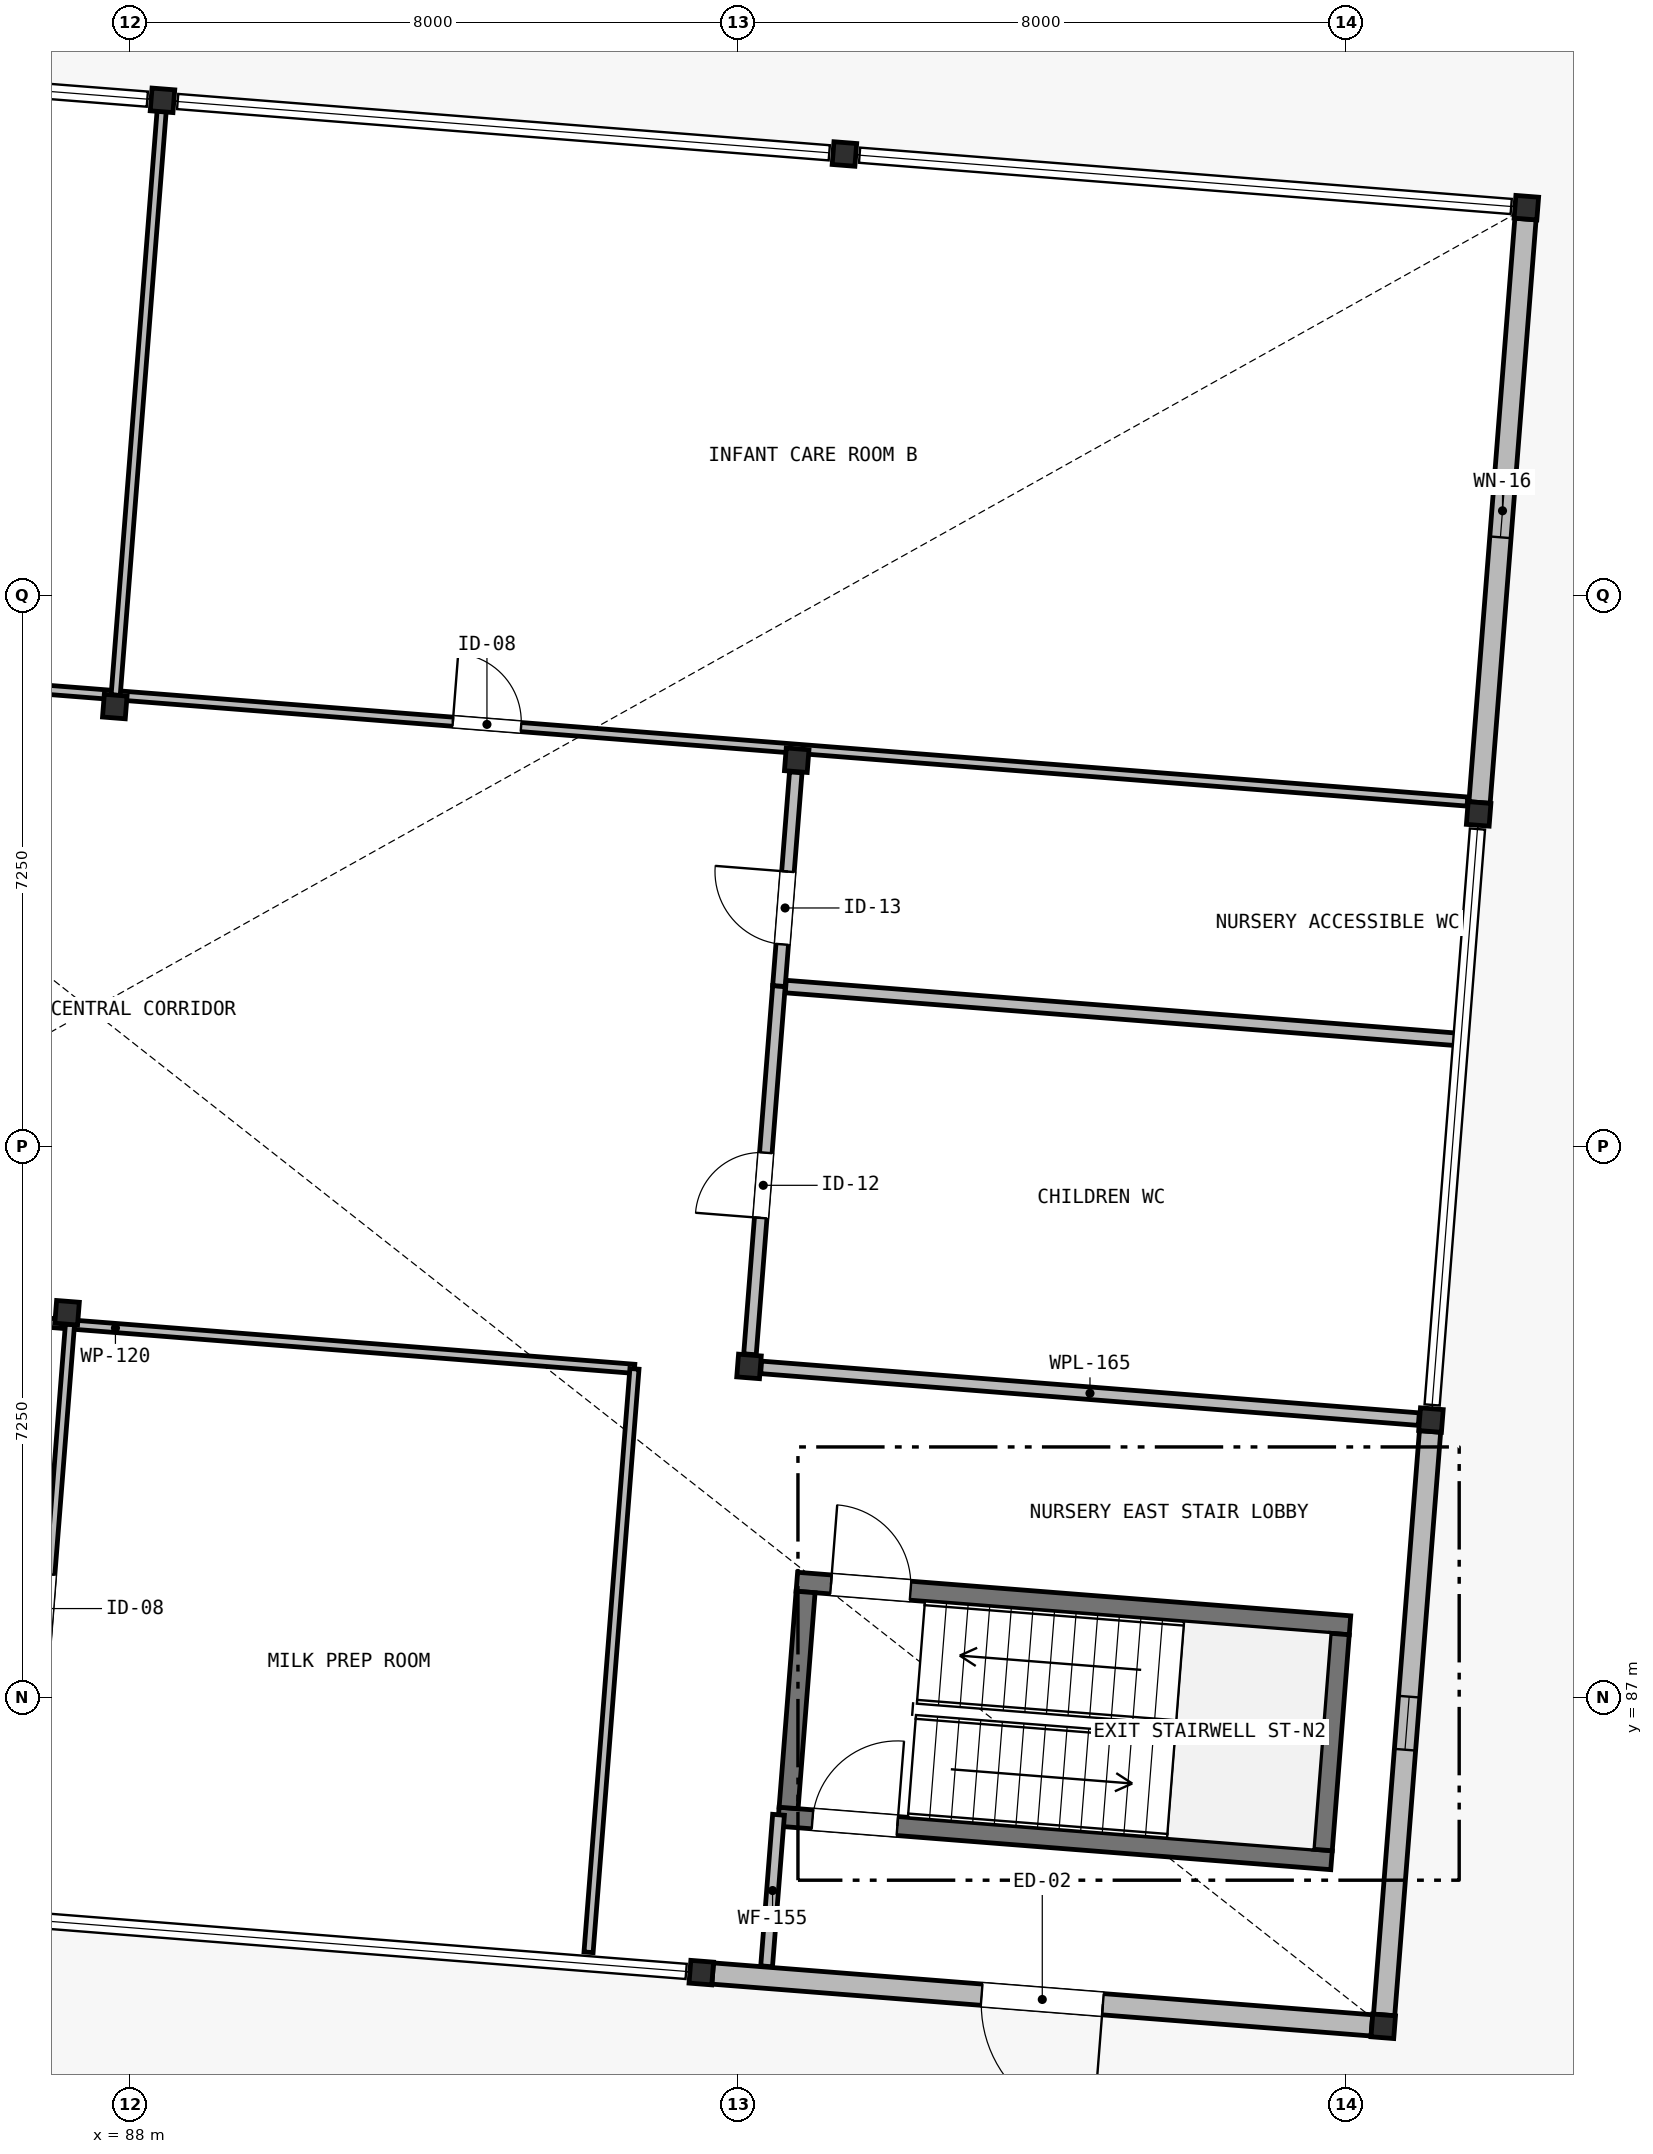
"""IFC4 building model, lengths in metres.
Left out: names, types, materials, properties, quantities, classifications, styles, units other than length and angle.
Written with IfcOpenShell. Run it as: python <this file> out.ifc"""

import sys

from ifc_helpers import new_model, si_unit, direction, frame, frame_2d, origin, origin_2d, place, context, subcontext, project, spatial, rectangle, hollow_rectangle, extrude, element, fill, save


model = new_model("IFC4")
c1 = context("Model", 3, precision=1e-05, world=origin(), true_north=direction((0.0, 1.0)))
c2 = subcontext(c1, "Body", "Model", "MODEL_VIEW")
j1 = project(units=[si_unit("LENGTHUNIT", "METRE"), si_unit("PLANEANGLEUNIT", "RADIAN")], contexts=[c1])
p1 = place(None, origin())
s1 = spatial("IfcSite", under=j1, at=p1, CompositionType="ELEMENT")
p2 = place(p1, origin())
s2 = spatial("IfcBuilding", under=s1, at=p2, CompositionType="ELEMENT")
p3 = place(p2, origin())
s3 = spatial("IfcBuildingStorey", under=s2, at=p3, CompositionType="ELEMENT", Elevation=0.0)
for number, where, z_axis, x_axis in (
    (1, (87.172, 92.063, -0.35), (0.0, 0.0, 1.0), (0.997, -0.078, 0.0)),
    (2, (87.8, 100.038, -0.35), (0.0, 0.0, 1.0), (0.997, -0.078, 0.0)),
    (3, (88.427, 108.014, -0.35), (0.0, 0.0, 1.0), (0.997, -0.078, 0.0)),
    (4, (95.517, 83.382, -0.35), (0.0, 0.0, 1.0), (0.997, -0.078, 0.0)),
    (5, (96.145, 91.357, -0.35), (0.0, 0.0, 1.0), (0.997, -0.078, 0.0)),
    (6, (96.772, 99.332, -0.35), (0.0, 0.0, 1.0), (0.997, -0.078, 0.0)),
    (7, (97.4, 107.308, -0.35), (0.0, 0.0, 1.0), (0.997, -0.078, 0.0)),
    (8, (104.489, 82.676, -0.35), (0.0, 0.0, 1.0), (0.997, -0.078, 0.0)),
    (9, (105.117, 90.651, -0.35), (0.0, 0.0, 1.0), (0.997, -0.078, 0.0)),
    (10, (105.744, 98.626, -0.35), (0.0, 0.0, 1.0), (0.997, -0.078, 0.0)),
    (11, (106.372, 106.602, -0.35), (0.0, 0.0, 1.0), (0.997, -0.078, 0.0)),
):
    element("IfcColumn", number, at=place(p3, frame(where, z_axis=z_axis, x_axis=x_axis)), inside=s3, PredefinedType="COLUMN", context=c2, shape_type="SweptSolid", body=[
        extrude(hollow_rectangle(XDim=0.3, YDim=0.3, WallThickness=0.016, at=origin_2d()), origin(), (0.0, 0.0, 1.0), 4.85),
    ])
p4 = place(p3, frame((96.774, 88.524, -0.35), z_axis=(0.0, 0.0, 1.0), x_axis=(0.996917178022, -0.078461074196, 0.0)))
e12 = element("IfcWall", 12, at=p4, inside=s3, PredefinedType="SHEAR", context=c2, shape_type="SweptSolid", body=[
    extrude(rectangle(XDim=7.3, YDim=0.25, at=frame_2d((3.65, 0.0))), origin(), (0.0, 0.0, 1.0), 4.85),
])
p5 = place(p4, frame((0.45, 0.0, 0.35)))
e13 = element("IfcOpeningElement", 13, at=p5, cuts=e12, PredefinedType="OPENING", context=c2, shape_type="SweptSolid", body=[
    extrude(rectangle(XDim=1.05, YDim=2.15, at=frame_2d((0.525, 1.075))), frame((0.0, 0.14, 0.0), z_axis=(0.0, -1.0, 0.0), x_axis=(1.0, 0.0, 0.0)), (0.0, 0.0, 1.0), 0.28),
])
p6 = place(p3, frame((96.531, 85.433, -0.35), z_axis=(0.0, 0.0, 1.0), x_axis=(0.996917383902, -0.078458458272, 0.0)))
e14 = element("IfcWall", 14, at=p6, inside=s3, PredefinedType="SHEAR", context=c2, shape_type="SweptSolid", body=[
    extrude(rectangle(XDim=7.3, YDim=0.25, at=frame_2d((3.65, 0.0))), origin(), (0.0, 0.0, 1.0), 4.85),
])
p7 = place(p6, frame((0.45, 0.0, 0.35)))
e15 = element("IfcOpeningElement", 15, at=p7, cuts=e14, PredefinedType="OPENING", context=c2, shape_type="SweptSolid", body=[
    extrude(rectangle(XDim=1.12, YDim=2.15, at=frame_2d((0.56, 1.075))), frame((0.0, 0.14, 0.0), z_axis=(0.0, -1.0, 0.0), x_axis=(1.0, 0.0, 0.0)), (0.0, 0.0, 1.0), 0.28),
])
p8 = place(p3, frame((96.665, 85.548, -0.35), z_axis=(0.0, 0.0, 1.0), x_axis=(0.078465015546, 0.996916867816, 0.0)))
e16 = element("IfcWall", 16, at=p8, inside=s3, PredefinedType="SHEAR", context=c2, shape_type="SweptSolid", body=[
    extrude(rectangle(XDim=2.85, YDim=0.25, at=frame_2d((1.425, 0.0))), origin(), (0.0, 0.0, 1.0), 4.85),
])
p9 = place(p3, frame((103.694, 84.995, -0.35), z_axis=(0.0, 0.0, 1.0), x_axis=(0.078471716745, 0.996916340357, 0.0)))
e17 = element("IfcWall", 17, at=p9, inside=s3, PredefinedType="SHEAR", context=c2, shape_type="SweptSolid", body=[
    extrude(rectangle(XDim=2.85, YDim=0.25, at=frame_2d((1.425, 0.0))), origin(), (0.0, 0.0, 1.0), 4.85),
])
p10 = place(p3, frame((104.34, 82.687, 0.0), z_axis=(0.0, 0.0, 1.0), x_axis=(-0.996917238993, 0.078460299505, 0.0)))
e18 = element("IfcWall", 18, at=p10, inside=s3, PredefinedType="SOLIDWALL", context=c2, shape_type="SweptSolid", body=[
    extrude(rectangle(XDim=8.7, YDim=0.28, at=frame_2d((4.35, 0.0))), origin(), (0.0, 0.0, 1.0), 3.83),
])
p11 = place(p10, frame((3.55, 0.0, 0.0)))
e19 = element("IfcOpeningElement", 19, at=p11, cuts=e18, PredefinedType="OPENING", context=c2, shape_type="SweptSolid", body=[
    extrude(rectangle(XDim=1.6, YDim=2.35, at=frame_2d((0.8, 1.175))), frame((0.0, 0.155, 0.0), z_axis=(0.0, -1.0, 0.0), x_axis=(1.0, 0.0, 0.0)), (0.0, 0.0, 1.0), 0.31),
])
p12 = place(p3, frame((105.105, 90.501, 0.0), z_axis=(0.0, 0.0, 1.0), x_axis=(-0.078473620365, -0.996916190513, 0.0)))
e20 = element("IfcWall", 20, at=p12, inside=s3, PredefinedType="SOLIDWALL", context=c2, shape_type="SweptSolid", body=[
    extrude(rectangle(XDim=7.7, YDim=0.28, at=frame_2d((3.85, 0.0))), origin(), (0.0, 0.0, 1.0), 3.83),
])
p13 = place(p12, frame((3.5, 0.0, 0.45)))
e21 = element("IfcOpeningElement", 21, at=p13, cuts=e20, PredefinedType="OPENING", context=c2, shape_type="SweptSolid", body=[
    extrude(rectangle(XDim=0.7, YDim=2.14, at=frame_2d((0.35, 1.07))), frame((0.0, 0.155, 0.0), z_axis=(0.0, -1.0, 0.0), x_axis=(1.0, 0.0, 0.0)), (0.0, 0.0, 1.0), 0.31),
])
p14 = place(p3, frame((106.36, 106.452, 0.0), z_axis=(0.0, 0.0, 1.0), x_axis=(-0.078473620365, -0.996916190513, 0.0)))
e22 = element("IfcWall", 22, at=p14, inside=s3, PredefinedType="SOLIDWALL", context=c2, shape_type="SweptSolid", body=[
    extrude(rectangle(XDim=7.7, YDim=0.28, at=frame_2d((3.85, 0.0))), origin(), (0.0, 0.0, 1.0), 3.83),
])
p15 = place(p14, frame((3.5, 0.0, 0.45)))
e23 = element("IfcOpeningElement", 23, at=p15, cuts=e22, PredefinedType="OPENING", context=c2, shape_type="SweptSolid", body=[
    extrude(rectangle(XDim=0.7, YDim=2.14, at=frame_2d((0.35, 1.07))), frame((0.0, 0.155, 0.0), z_axis=(0.0, -1.0, 0.0), x_axis=(1.0, 0.0, 0.0)), (0.0, 0.0, 1.0), 0.31),
])
p16 = place(p3, frame((80.979, 92.4, 0.0), z_axis=(0.0, 0.0, 1.0), x_axis=(0.996918352409, -0.078446151144, 0.0)))
e24 = element("IfcWall", 24, at=p16, inside=s3, PredefinedType="PARTITIONING", context=c2, shape_type="SweptSolid", body=[
    extrude(rectangle(XDim=13.7, YDim=0.12, at=frame_2d((6.85, 0.0))), origin(), (0.0, 0.0, 1.0), 3.844),
])
p17 = place(p16, frame((3.2, 0.0, 0.0)))
e25 = element("IfcOpeningElement", 25, at=p17, cuts=e24, PredefinedType="OPENING", context=c2, shape_type="SweptSolid", body=[
    extrude(rectangle(XDim=0.9, YDim=2.1, at=frame_2d((0.45, 1.05))), frame((0.0, 0.075, 0.0), z_axis=(0.0, -1.0, 0.0), x_axis=(1.0, 0.0, 0.0)), (0.0, 0.0, 1.0), 0.15),
])
p18 = place(p3, frame((94.033, 83.649, 0.0), z_axis=(0.0, 0.0, 1.0), x_axis=(0.078442108986, 0.996918670473, 0.0)))
e26 = element("IfcWall", 26, at=p18, inside=s3, PredefinedType="PARTITIONING", context=c2, shape_type="SweptSolid", body=[
    extrude(rectangle(XDim=7.7, YDim=0.12, at=frame_2d((3.85, 0.0))), origin(), (0.0, 0.0, 1.0), 4.23),
])
p19 = place(p3, frame((70.027, 101.588, 0.0), z_axis=(0.0, 0.0, 1.0), x_axis=(0.996917529869, -0.078456603549, 0.0)))
e27 = element("IfcWall", 27, at=p19, inside=s3, PredefinedType="PARTITIONING", context=c2, shape_type="SweptSolid", body=[
    extrude(rectangle(XDim=17.84, YDim=0.12, at=frame_2d((8.92, 0.0))), origin(), (0.0, 0.0, 1.0), 3.844),
])
p20 = place(p19, frame((11.45, 0.0, 0.0)))
e28 = element("IfcOpeningElement", 28, at=p20, cuts=e27, PredefinedType="OPENING", context=c2, shape_type="SweptSolid", body=[
    extrude(rectangle(XDim=0.88, YDim=2.1, at=frame_2d((0.44, 1.05))), frame((0.0, 0.075, 0.0), z_axis=(0.0, -1.0, 0.0), x_axis=(1.0, 0.0, 0.0)), (0.0, 0.0, 1.0), 0.15),
])
p21 = place(p3, frame((87.812, 100.188, 0.0), z_axis=(0.0, 0.0, 1.0), x_axis=(0.996917614105, -0.078455533188, 0.0)))
e29 = element("IfcWall", 29, at=p21, inside=s3, PredefinedType="PARTITIONING", context=c2, shape_type="SweptSolid", body=[
    extrude(rectangle(XDim=17.84, YDim=0.12, at=frame_2d((8.92, 0.0))), origin(), (0.0, 0.0, 1.0), 3.844),
])
p22 = place(p21, frame((4.45, 0.0, 0.0)))
e30 = element("IfcOpeningElement", 30, at=p22, cuts=e29, PredefinedType="OPENING", context=c2, shape_type="SweptSolid", body=[
    extrude(rectangle(XDim=0.9, YDim=2.1, at=frame_2d((0.45, 1.05))), frame((0.0, 0.075, 0.0), z_axis=(0.0, -1.0, 0.0), x_axis=(1.0, 0.0, 0.0)), (0.0, 0.0, 1.0), 0.15),
])
p23 = place(p3, frame((96.304, 91.344, 0.0), z_axis=(0.0, 0.0, 1.0), x_axis=(0.9969162409, -0.078472980254, 0.0)))
e31 = element("IfcWall", 31, at=p23, inside=s3, PredefinedType="PLUMBINGWALL", context=c2, shape_type="SweptSolid", body=[
    extrude(rectangle(XDim=8.68, YDim=0.165, at=frame_2d((4.34, 0.0))), origin(), (0.0, 0.0, 1.0), 3.844),
])
p24 = place(p3, frame((96.157, 91.516, 0.0), z_axis=(0.0, 0.0, 1.0), x_axis=(0.078463385465, 0.996916996114, 0.0)))
e32 = element("IfcWall", 32, at=p24, inside=s3, PredefinedType="PLUMBINGWALL", context=c2, shape_type="SweptSolid", body=[
    extrude(rectangle(XDim=4.86, YDim=0.165, at=frame_2d((2.43, 0.0))), origin(), (0.0, 0.0, 1.0), 3.844),
])
p25 = place(p24, frame((1.8, 0.0, 0.0)))
e33 = element("IfcOpeningElement", 33, at=p25, cuts=e32, PredefinedType="OPENING", context=c2, shape_type="SweptSolid", body=[
    extrude(rectangle(XDim=0.86, YDim=2.1, at=frame_2d((0.43, 1.05))), frame((0.0, 0.097, 0.0), z_axis=(0.0, -1.0, 0.0), x_axis=(1.0, 0.0, 0.0)), (0.0, 0.0, 1.0), 0.195),
])
p26 = place(p3, frame((96.538, 96.362, 0.0), z_axis=(0.0, 0.0, 1.0), x_axis=(0.078437571766, 0.996919027472, 0.0)))
e34 = element("IfcWall", 34, at=p26, inside=s3, PredefinedType="PLUMBINGWALL", context=c2, shape_type="SweptSolid", body=[
    extrude(rectangle(XDim=2.82, YDim=0.165, at=frame_2d((1.41, 0.0))), origin(), (0.0, 0.0, 1.0), 3.844),
])
p27 = place(p26, frame((0.55, 0.0, 0.0)))
e35 = element("IfcOpeningElement", 35, at=p27, cuts=e34, PredefinedType="OPENING", context=c2, shape_type="SweptSolid", body=[
    extrude(rectangle(XDim=0.96, YDim=2.12, at=frame_2d((0.48, 1.06))), frame((0.0, 0.097, 0.0), z_axis=(0.0, -1.0, 0.0), x_axis=(1.0, 0.0, 0.0)), (0.0, 0.0, 1.0), 0.195),
])
p28 = place(p3, frame((87.812, 100.188, 0.0), z_axis=(0.0, 0.0, 1.0), x_axis=(0.078462944011, 0.996917030859, 0.0)))
e36 = element("IfcWall", 36, at=p28, inside=s3, PredefinedType="PARTITIONING", context=c2, shape_type="SweptSolid", body=[
    extrude(rectangle(XDim=7.81, YDim=0.12, at=frame_2d((3.905, 0.0))), origin(), (0.0, 0.0, 1.0), 3.844),
])
p29 = place(p3, frame((96.628, 96.354, 0.0), z_axis=(0.0, 0.0, 1.0), x_axis=(0.996916420474, -0.078470698917, 0.0)))
e37 = element("IfcWall", 37, at=p29, inside=s3, PredefinedType="PLUMBINGWALL", context=c2, shape_type="SweptSolid", body=[
    extrude(rectangle(XDim=8.87, YDim=0.165, at=frame_2d((4.435, 0.0))), origin(), (0.0, 0.0, 1.0), 4.23),
])
p30 = place(p3, frame((96.376, 83.464, 0.0), z_axis=(0.0, 0.0, 1.0), x_axis=(0.078367278648, 0.99692455564, 0.0)))
e38 = element("IfcWall", 38, at=p30, inside=s3, PredefinedType="PARTITIONING", context=c2, shape_type="SweptSolid", body=[
    extrude(rectangle(XDim=2.0, YDim=0.155, at=frame_2d((1.0, 0.0))), origin(), (0.0, 0.0, 1.0), 4.23),
])
p31 = place(p3, frame((86.606, 84.233, 0.0), z_axis=(0.0, 0.0, 1.0), x_axis=(0.078442108986, 0.996918670473, 0.0)))
e39 = element("IfcWall", 39, at=p31, inside=s3, PredefinedType="PARTITIONING", context=c2, shape_type="SweptSolid", body=[
    extrude(rectangle(XDim=7.7, YDim=0.12, at=frame_2d((3.85, 0.0))), origin(), (0.0, 0.0, 1.0), 3.844),
])
p32 = place(p31, frame((3.5, 0.0, 0.0)))
e40 = element("IfcOpeningElement", 40, at=p32, cuts=e39, PredefinedType="OPENING", context=c2, shape_type="SweptSolid", body=[
    extrude(rectangle(XDim=0.9, YDim=2.1, at=frame_2d((0.45, 1.05))), frame((0.0, 0.075, 0.0), z_axis=(0.0, -1.0, 0.0), x_axis=(1.0, 0.0, 0.0)), (0.0, 0.0, 1.0), 0.15),
])
p33 = place(p11, origin())
e41 = element("IfcDoor", 41, at=p33, inside=s3, OperationType="DOUBLE_DOOR_SINGLE_SWING", PredefinedType="DOOR", context=c2, shape_type="SweptSolid", body=[
    extrude(rectangle(XDim=1.6, YDim=2.35, at=frame_2d((0.8, 1.175))), frame((0.0, 0.025, 0.0), z_axis=(0.0, -1.0, 0.0), x_axis=(1.0, 0.0, 0.0)), (0.0, 0.0, 1.0), 0.05),
])
fill(e19, e41)
p34 = place(p13, origin())
e42 = element("IfcWindow", 42, at=p34, inside=s3, PartitioningType="SINGLE_PANEL", PredefinedType="WINDOW", context=c2, shape_type="SweptSolid", body=[
    extrude(rectangle(XDim=0.7, YDim=2.14, at=frame_2d((0.35, 1.07))), frame((0.0, 0.03, 0.0), z_axis=(0.0, -1.0, 0.0), x_axis=(1.0, 0.0, 0.0)), (0.0, 0.0, 1.0), 0.06),
])
fill(e21, e42)
p35 = place(p15, origin())
e43 = element("IfcWindow", 43, at=p35, inside=s3, PartitioningType="SINGLE_PANEL", PredefinedType="WINDOW", context=c2, shape_type="SweptSolid", body=[
    extrude(rectangle(XDim=0.7, YDim=2.14, at=frame_2d((0.35, 1.07))), frame((0.0, 0.03, 0.0), z_axis=(0.0, -1.0, 0.0), x_axis=(1.0, 0.0, 0.0)), (0.0, 0.0, 1.0), 0.06),
])
fill(e23, e43)
p36 = place(p22, origin())
e44 = element("IfcDoor", 44, at=p36, inside=s3, OperationType="SINGLE_SWING_LEFT", PredefinedType="DOOR", context=c2, shape_type="SweptSolid", body=[
    extrude(rectangle(XDim=0.9, YDim=2.1, at=frame_2d((0.45, 1.05))), frame((0.0, 0.025, 0.0), z_axis=(0.0, -1.0, 0.0), x_axis=(1.0, 0.0, 0.0)), (0.0, 0.0, 1.0), 0.05),
])
fill(e30, e44)
p37 = place(p25, origin())
e45 = element("IfcDoor", 45, at=p37, inside=s3, OperationType="SINGLE_SWING_LEFT", PredefinedType="DOOR", context=c2, shape_type="SweptSolid", body=[
    extrude(rectangle(XDim=0.86, YDim=2.1, at=frame_2d((0.43, 1.05))), frame((0.0, 0.025, 0.0), z_axis=(0.0, -1.0, 0.0), x_axis=(1.0, 0.0, 0.0)), (0.0, 0.0, 1.0), 0.05),
])
fill(e33, e45)
p38 = place(p27, origin())
e46 = element("IfcDoor", 46, at=p38, inside=s3, OperationType="SINGLE_SWING_RIGHT", PredefinedType="DOOR", context=c2, shape_type="SweptSolid", body=[
    extrude(rectangle(XDim=0.96, YDim=2.12, at=frame_2d((0.48, 1.06))), frame((0.0, 0.025, 0.0), z_axis=(0.0, -1.0, 0.0), x_axis=(1.0, 0.0, 0.0)), (0.0, 0.0, 1.0), 0.05),
])
fill(e35, e46)
p39 = place(p5, origin())
e47 = element("IfcDoor", 47, at=p39, inside=s3, OperationType="SINGLE_SWING_LEFT", PredefinedType="DOOR", context=c2, shape_type="SweptSolid", body=[
    extrude(rectangle(XDim=1.05, YDim=2.15, at=frame_2d((0.525, 1.075))), frame((0.0, 0.025, 0.0), z_axis=(0.0, -1.0, 0.0), x_axis=(1.0, 0.0, 0.0)), (0.0, 0.0, 1.0), 0.05),
])
fill(e13, e47)
p40 = place(p7, origin())
e48 = element("IfcDoor", 48, at=p40, inside=s3, OperationType="SINGLE_SWING_RIGHT", PredefinedType="DOOR", context=c2, shape_type="SweptSolid", body=[
    extrude(rectangle(XDim=1.12, YDim=2.15, at=frame_2d((0.56, 1.075))), frame((0.0, 0.025, 0.0), z_axis=(0.0, -1.0, 0.0), x_axis=(1.0, 0.0, 0.0)), (0.0, 0.0, 1.0), 0.05),
])
fill(e15, e48)
save(model, sys.argv[1])
